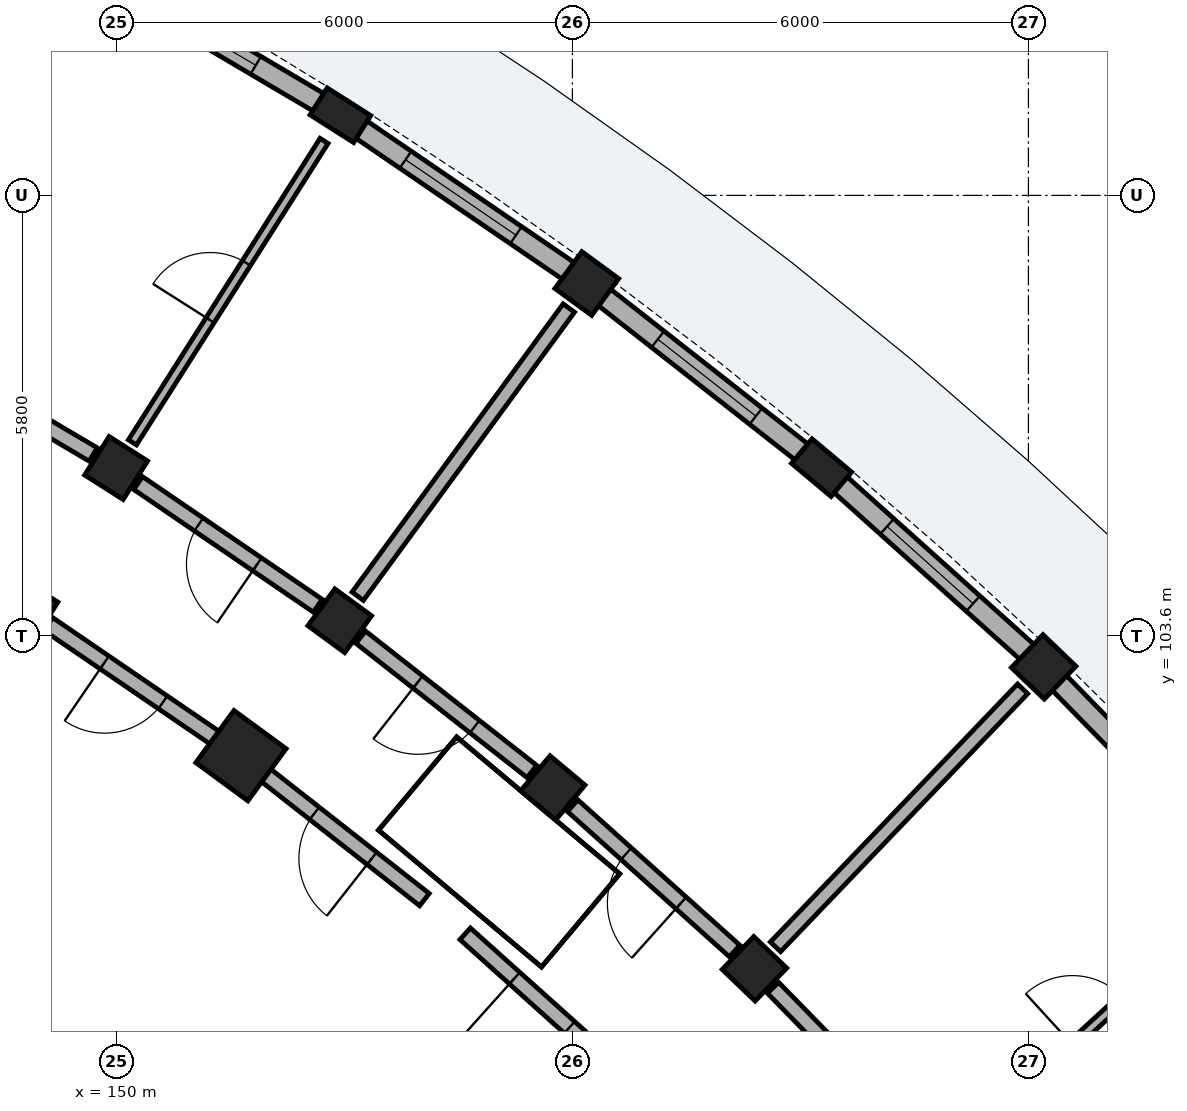
"""IFC4 building model, lengths in metres.
Left out: names, types, materials, properties, quantities, classifications, styles, units other than length and angle.
Written with IfcOpenShell. Run it as: python <this file> out.ifc"""

import sys

from ifc_helpers import new_model, si_unit, direction, frame, frame_2d, origin, origin_2d, place, context, subcontext, project, spatial, rectangle, extrude, element, fill, save


model = new_model("IFC4")
c1 = context("Model", 3, precision=1e-05, world=origin(), true_north=direction((0.0, 1.0)))
c2 = subcontext(c1, "Body", "Model", "MODEL_VIEW")
j1 = project(units=[si_unit("LENGTHUNIT", "METRE"), si_unit("PLANEANGLEUNIT", "RADIAN")], contexts=[c1])
p1 = place(None, origin())
s1 = spatial("IfcSite", under=j1, at=p1, CompositionType="ELEMENT")
p2 = place(p1, origin())
s2 = spatial("IfcBuilding", under=s1, at=p2, CompositionType="ELEMENT")
p3 = place(p2, origin())
s3 = spatial("IfcBuildingStorey", under=s2, at=p3, CompositionType="ELEMENT", Elevation=0.0)
for number, where, z_axis, x_axis in (
    (1, (158.395, 99.226, 0.0), (0.0, 0.0, 1.0), (0.692, 0.722, 0.0)),
    (2, (162.2, 103.197, 0.0), (0.0, 0.0, 1.0), (0.692, 0.722, 0.0)),
    (3, (155.743, 101.605, 0.0), (0.0, 0.0, 1.0), (0.643, 0.766, 0.0)),
):
    element("IfcColumn", number, at=place(p3, frame(where, z_axis=z_axis, x_axis=x_axis)), inside=s3, PredefinedType="COLUMN", context=c2, shape_type="SweptSolid", body=[
        extrude(rectangle(XDim=0.6, YDim=0.6, at=origin_2d()), origin(), (0.0, 0.0, 1.0), 4.485),
    ])
p4 = place(p3, frame((159.278, 105.818, 0.0), z_axis=(0.0, 0.0, 1.0), x_axis=(0.642787582947, 0.766044465556, 0.0)))
e4 = element("IfcColumn", 4, at=p4, inside=s3, PredefinedType="PILASTER", context=c2, shape_type="SweptSolid", body=[
    extrude(rectangle(XDim=0.42, YDim=0.68, at=origin_2d()), origin(), (0.0, 0.0, 1.0), 4.485),
])
p5 = place(p3, frame((151.639, 102.029, 0.0), z_axis=(0.0, 0.0, 1.0), x_axis=(0.590918572221, 0.806731207407, 0.0)))
e5 = element("IfcColumn", 5, at=p5, inside=s3, PredefinedType="COLUMN", context=c2, shape_type="SweptSolid", body=[
    extrude(rectangle(XDim=0.85, YDim=0.85, at=origin_2d()), origin(), (0.0, 0.0, 1.0), 4.485),
])
for number, where, z_axis, x_axis in (
    (6, (152.939, 103.804, 0.0), (0.0, 0.0, 1.0), (0.591, 0.807, 0.0)),
    (7, (156.189, 108.241, 0.0), (0.0, 0.0, 1.0), (0.591, 0.807, 0.0)),
    (8, (148.817, 103.957, 0.0), (0.0, 0.0, 1.0), (0.536, 0.844, 0.0)),
    (9, (149.997, 105.813, 0.0), (0.0, 0.0, 1.0), (0.536, 0.844, 0.0)),
):
    element("IfcColumn", number, at=place(p3, frame(where, z_axis=z_axis, x_axis=x_axis)), inside=s3, PredefinedType="COLUMN", context=c2, shape_type="SweptSolid", body=[
        extrude(rectangle(XDim=0.6, YDim=0.6, at=origin_2d()), origin(), (0.0, 0.0, 1.0), 4.485),
    ])
p6 = place(p3, frame((152.948, 110.455, 0.0), z_axis=(0.0, 0.0, 1.0), x_axis=(0.536481544469, 0.843912052553, 0.0)))
e10 = element("IfcColumn", 10, at=p6, inside=s3, PredefinedType="PILASTER", context=c2, shape_type="SweptSolid", body=[
    extrude(rectangle(XDim=0.42, YDim=0.68, at=origin_2d()), origin(), (0.0, 0.0, 1.0), 4.485),
])
p7 = place(p3, frame((164.818, 100.518, 0.0), z_axis=(0.0, 0.0, 1.0), x_axis=(-0.69884067125, 0.715277370121, 0.0)))
e11 = element("IfcWall", 11, at=p7, inside=s3, PredefinedType="SOLIDWALL", context=c2, shape_type="SweptSolid", body=[
    extrude(rectangle(XDim=3.476, YDim=0.27, at=frame_2d((1.738, 0.0))), origin(), (0.0, 0.0, 1.0), 3.755),
])
p8 = place(p7, frame((1.038, 0.0, 0.55)))
e12 = element("IfcOpeningElement", 12, at=p8, cuts=e11, PredefinedType="OPENING", context=c2, shape_type="SweptSolid", body=[
    extrude(rectangle(XDim=1.4, YDim=1.635, at=frame_2d((0.7, 0.817))), frame((0.0, 0.145, 0.0), z_axis=(0.0, -1.0, 0.0), x_axis=(1.0, 0.0, 0.0)), (0.0, 0.0, 1.0), 0.29),
])
p9 = place(p3, frame((162.0, 103.377, 0.0), z_axis=(0.0, 0.0, 1.0), x_axis=(-0.744452648125, 0.667675261411, 0.0)))
e13 = element("IfcWall", 13, at=p9, inside=s3, PredefinedType="SOLIDWALL", context=c2, shape_type="SweptSolid", body=[
    extrude(rectangle(XDim=3.476, YDim=0.27, at=frame_2d((1.738, 0.0))), origin(), (0.0, 0.0, 1.0), 3.755),
])
p10 = place(p9, frame((0.978, 0.0, 0.55)))
e14 = element("IfcOpeningElement", 14, at=p10, cuts=e13, PredefinedType="OPENING", context=c2, shape_type="SweptSolid", body=[
    extrude(rectangle(XDim=1.52, YDim=1.485, at=frame_2d((0.76, 0.743))), frame((0.0, 0.145, 0.0), z_axis=(0.0, -1.0, 0.0), x_axis=(1.0, 0.0, 0.0)), (0.0, 0.0, 1.0), 0.29),
])
p11 = place(p3, frame((159.136, 105.929, 0.0), z_axis=(0.0, 0.0, 1.0), x_axis=(-0.786815295284, 0.617188537731, 0.0)))
e15 = element("IfcWall", 15, at=p11, inside=s3, PredefinedType="SOLIDWALL", context=c2, shape_type="SweptSolid", body=[
    extrude(rectangle(XDim=3.476, YDim=0.27, at=frame_2d((1.738, 0.0))), origin(), (0.0, 0.0, 1.0), 3.755),
])
p12 = place(p11, frame((0.918, 0.0, 0.55)))
e16 = element("IfcOpeningElement", 16, at=p12, cuts=e15, PredefinedType="OPENING", context=c2, shape_type="SweptSolid", body=[
    extrude(rectangle(XDim=1.64, YDim=1.56, at=frame_2d((0.82, 0.78))), frame((0.0, 0.145, 0.0), z_axis=(0.0, -1.0, 0.0), x_axis=(1.0, 0.0, 0.0)), (0.0, 0.0, 1.0), 0.29),
])
p13 = place(p3, frame((155.966, 108.393, 0.0), z_axis=(0.0, 0.0, 1.0), x_axis=(-0.825751510897, 0.564034078981, 0.0)))
e17 = element("IfcWall", 17, at=p13, inside=s3, PredefinedType="SOLIDWALL", context=c2, shape_type="SweptSolid", body=[
    extrude(rectangle(XDim=3.476, YDim=0.27, at=frame_2d((1.738, 0.0))), origin(), (0.0, 0.0, 1.0), 3.755),
])
p14 = place(p13, frame((0.858, 0.0, 0.55)))
e18 = element("IfcOpeningElement", 18, at=p14, cuts=e17, PredefinedType="OPENING", context=c2, shape_type="SweptSolid", body=[
    extrude(rectangle(XDim=1.76, YDim=1.635, at=frame_2d((0.88, 0.817))), frame((0.0, 0.145, 0.0), z_axis=(0.0, -1.0, 0.0), x_axis=(1.0, 0.0, 0.0)), (0.0, 0.0, 1.0), 0.29),
])
p15 = place(p3, frame((152.792, 110.546, 0.0), z_axis=(0.0, 0.0, 1.0), x_axis=(-0.861127819205, 0.50838851186, 0.0)))
e19 = element("IfcWall", 19, at=p15, inside=s3, PredefinedType="SOLIDWALL", context=c2, shape_type="SweptSolid", body=[
    extrude(rectangle(XDim=3.476, YDim=0.27, at=frame_2d((1.738, 0.0))), origin(), (0.0, 0.0, 1.0), 3.755),
])
p16 = place(p15, frame((1.113, 0.0, 0.55)))
e20 = element("IfcOpeningElement", 20, at=p16, cuts=e19, PredefinedType="OPENING", context=c2, shape_type="SweptSolid", body=[
    extrude(rectangle(XDim=1.25, YDim=1.6, at=frame_2d((0.625, 0.8))), frame((0.0, 0.145, 0.0), z_axis=(0.0, -1.0, 0.0), x_axis=(1.0, 0.0, 0.0)), (0.0, 0.0, 1.0), 0.29),
])
p17 = place(p3, frame((161.18, 96.947, 0.0), z_axis=(0.0, 0.0, 1.0), x_axis=(0.737934199263, 0.674872667663, 0.0)))
e21 = element("IfcWall", 21, at=p17, inside=s3, PredefinedType="PARTITIONING", context=c2, shape_type="SweptSolid", body=[
    extrude(rectangle(XDim=4.7, YDim=0.125, at=frame_2d((2.35, 0.0))), origin(), (0.0, 0.0, 1.0), 3.1),
])
p18 = place(p17, frame((1.895, 0.0, 0.0)))
e22 = element("IfcOpeningElement", 22, at=p18, cuts=e21, PredefinedType="OPENING", context=c2, shape_type="SweptSolid", body=[
    extrude(rectangle(XDim=0.91, YDim=2.1, at=frame_2d((0.455, 1.05))), frame((0.0, 0.073, 0.0), z_axis=(0.0, -1.0, 0.0), x_axis=(1.0, 0.0, 0.0)), (0.0, 0.0, 1.0), 0.145),
])
p19 = place(p3, frame((160.641, 96.927, 0.0), z_axis=(0.0, 0.0, 1.0), x_axis=(-0.698787219683, 0.715329589496, 0.0)))
e23 = element("IfcWall", 23, at=p19, inside=s3, PredefinedType="PARTITIONING", context=c2, shape_type="SweptSolid", body=[
    extrude(rectangle(XDim=2.863, YDim=0.205, at=frame_2d((1.432, 0.0))), origin(), (0.0, 0.0, 1.0), 3.1),
])
p20 = place(p19, frame((0.937, 0.0, 0.0)))
e24 = element("IfcOpeningElement", 24, at=p20, cuts=e23, PredefinedType="OPENING", context=c2, shape_type="SweptSolid", body=[
    extrude(rectangle(XDim=0.99, YDim=2.16, at=frame_2d((0.495, 1.08))), frame((0.0, 0.113, 0.0), z_axis=(0.0, -1.0, 0.0), x_axis=(1.0, 0.0, 0.0)), (0.0, 0.0, 1.0), 0.225),
])
p21 = place(p3, frame((158.672, 99.514, 0.0), z_axis=(0.0, 0.0, 1.0), x_axis=(0.691855720025, 0.722035776585, 0.0)))
e25 = element("IfcWall", 25, at=p21, inside=s3, PredefinedType="PARTITIONING", context=c2, shape_type="SweptSolid", body=[
    extrude(rectangle(XDim=4.7, YDim=0.185, at=frame_2d((2.35, 0.0))), origin(), (0.0, 0.0, 1.0), 3.1),
])
p22 = place(p3, frame((158.135, 99.459, 0.0), z_axis=(0.0, 0.0, 1.0), x_axis=(-0.744433521088, 0.667696587291, 0.0)))
e26 = element("IfcWall", 26, at=p22, inside=s3, PredefinedType="PARTITIONING", context=c2, shape_type="SweptSolid", body=[
    extrude(rectangle(XDim=2.863, YDim=0.205, at=frame_2d((1.432, 0.0))), origin(), (0.0, 0.0, 1.0), 3.1),
])
p23 = place(p22, frame((0.947, 0.0, 0.0)))
e27 = element("IfcOpeningElement", 27, at=p23, cuts=e26, PredefinedType="OPENING", context=c2, shape_type="SweptSolid", body=[
    extrude(rectangle(XDim=0.97, YDim=2.15, at=frame_2d((0.485, 1.075))), frame((0.0, 0.113, 0.0), z_axis=(0.0, -1.0, 0.0), x_axis=(1.0, 0.0, 0.0)), (0.0, 0.0, 1.0), 0.225),
])
p24 = place(p3, frame((156.613, 97.871, 0.0), z_axis=(0.0, 0.0, 1.0), x_axis=(-0.744418559135, 0.667713268413, 0.0)))
e28 = element("IfcWall", 28, at=p24, inside=s3, PredefinedType="PARTITIONING", context=c2, shape_type="SweptSolid", body=[
    extrude(rectangle(XDim=2.718, YDim=0.205, at=frame_2d((1.359, 0.0))), origin(), (0.0, 0.0, 1.0), 3.1),
])
p25 = place(p24, frame((0.874, 0.0, 0.0)))
e29 = element("IfcOpeningElement", 29, at=p25, cuts=e28, PredefinedType="OPENING", context=c2, shape_type="SweptSolid", body=[
    extrude(rectangle(XDim=0.97, YDim=2.15, at=frame_2d((0.485, 1.075))), frame((0.0, 0.113, 0.0), z_axis=(0.0, -1.0, 0.0), x_axis=(1.0, 0.0, 0.0)), (0.0, 0.0, 1.0), 0.225),
])
p26 = place(p3, frame((155.467, 101.821, 0.0), z_axis=(0.0, 0.0, 1.0), x_axis=(-0.786806323554, 0.617199975061, 0.0)))
e30 = element("IfcWall", 30, at=p26, inside=s3, PredefinedType="PARTITIONING", context=c2, shape_type="SweptSolid", body=[
    extrude(rectangle(XDim=2.863, YDim=0.205, at=frame_2d((1.432, 0.0))), origin(), (0.0, 0.0, 1.0), 3.1),
])
p27 = place(p26, frame((0.957, 0.0, 0.0)))
e31 = element("IfcOpeningElement", 31, at=p27, cuts=e30, PredefinedType="OPENING", context=c2, shape_type="SweptSolid", body=[
    extrude(rectangle(XDim=0.95, YDim=2.13, at=frame_2d((0.475, 1.065))), frame((0.0, 0.113, 0.0), z_axis=(0.0, -1.0, 0.0), x_axis=(1.0, 0.0, 0.0)), (0.0, 0.0, 1.0), 0.225),
])
p28 = place(p3, frame((154.053, 100.135, 0.0), z_axis=(0.0, 0.0, 1.0), x_axis=(-0.786835457019, 0.617162833924, 0.0)))
e32 = element("IfcWall", 32, at=p28, inside=s3, PredefinedType="PARTITIONING", context=c2, shape_type="SweptSolid", body=[
    extrude(rectangle(XDim=2.718, YDim=0.205, at=frame_2d((1.359, 0.0))), origin(), (0.0, 0.0, 1.0), 3.1),
])
p29 = place(p28, frame((0.879, 0.0, 0.0)))
e33 = element("IfcOpeningElement", 33, at=p29, cuts=e32, PredefinedType="OPENING", context=c2, shape_type="SweptSolid", body=[
    extrude(rectangle(XDim=0.96, YDim=2.1, at=frame_2d((0.48, 1.05))), frame((0.0, 0.113, 0.0), z_axis=(0.0, -1.0, 0.0), x_axis=(1.0, 0.0, 0.0)), (0.0, 0.0, 1.0), 0.225),
])
p30 = place(p3, frame((153.176, 104.126, 0.0), z_axis=(0.0, 0.0, 1.0), x_axis=(0.590910940129, 0.806736797745, 0.0)))
e34 = element("IfcWall", 34, at=p30, inside=s3, PredefinedType="PARTITIONING", context=c2, shape_type="SweptSolid", body=[
    extrude(rectangle(XDim=4.7, YDim=0.185, at=frame_2d((2.35, 0.0))), origin(), (0.0, 0.0, 1.0), 3.1),
])
p31 = place(p3, frame((152.65, 104.001, 0.0), z_axis=(0.0, 0.0, 1.0), x_axis=(-0.825779671787, 0.563992848947, 0.0)))
e35 = element("IfcWall", 35, at=p31, inside=s3, PredefinedType="PARTITIONING", context=c2, shape_type="SweptSolid", body=[
    extrude(rectangle(XDim=2.863, YDim=0.205, at=frame_2d((1.432, 0.0))), origin(), (0.0, 0.0, 1.0), 3.1),
])
p32 = place(p31, frame((0.967, 0.0, 0.0)))
e36 = element("IfcOpeningElement", 36, at=p32, cuts=e35, PredefinedType="OPENING", context=c2, shape_type="SweptSolid", body=[
    extrude(rectangle(XDim=0.93, YDim=2.12, at=frame_2d((0.465, 1.06))), frame((0.0, 0.113, 0.0), z_axis=(0.0, -1.0, 0.0), x_axis=(1.0, 0.0, 0.0)), (0.0, 0.0, 1.0), 0.225),
])
p33 = place(p3, frame((151.35, 102.226, 0.0), z_axis=(0.0, 0.0, 1.0), x_axis=(-0.825752009056, 0.56403334967, 0.0)))
e37 = element("IfcWall", 37, at=p33, inside=s3, PredefinedType="PARTITIONING", context=c2, shape_type="SweptSolid", body=[
    extrude(rectangle(XDim=2.718, YDim=0.205, at=frame_2d((1.359, 0.0))), origin(), (0.0, 0.0, 1.0), 3.1),
])
p34 = place(p33, frame((0.894, 0.0, 0.0)))
e38 = element("IfcOpeningElement", 38, at=p34, cuts=e37, PredefinedType="OPENING", context=c2, shape_type="SweptSolid", body=[
    extrude(rectangle(XDim=0.93, YDim=2.12, at=frame_2d((0.465, 1.06))), frame((0.0, 0.113, 0.0), z_axis=(0.0, -1.0, 0.0), x_axis=(1.0, 0.0, 0.0)), (0.0, 0.0, 1.0), 0.225),
])
p35 = place(p3, frame((150.211, 106.151, 0.0), z_axis=(0.0, 0.0, 1.0), x_axis=(0.536492262982, 0.843905238614, 0.0)))
e39 = element("IfcWall", 39, at=p35, inside=s3, PredefinedType="PARTITIONING", context=c2, shape_type="SweptSolid", body=[
    extrude(rectangle(XDim=4.7, YDim=0.125, at=frame_2d((2.35, 0.0))), origin(), (0.0, 0.0, 1.0), 3.1),
])
p36 = place(p35, frame((1.905, 0.0, 0.0)))
e40 = element("IfcOpeningElement", 40, at=p36, cuts=e39, PredefinedType="OPENING", context=c2, shape_type="SweptSolid", body=[
    extrude(rectangle(XDim=0.89, YDim=2.1, at=frame_2d((0.445, 1.05))), frame((0.0, 0.073, 0.0), z_axis=(0.0, -1.0, 0.0), x_axis=(1.0, 0.0, 0.0)), (0.0, 0.0, 1.0), 0.145),
])
p37 = place(p3, frame((149.695, 105.991, 0.0), z_axis=(0.0, 0.0, 1.0), x_axis=(-0.861113214678, 0.508413248753, 0.0)))
e41 = element("IfcWall", 41, at=p37, inside=s3, PredefinedType="PARTITIONING", context=c2, shape_type="SweptSolid", body=[
    extrude(rectangle(XDim=2.863, YDim=0.205, at=frame_2d((1.432, 0.0))), origin(), (0.0, 0.0, 1.0), 3.1),
])
p38 = place(p37, frame((0.937, 0.0, 0.0)))
e42 = element("IfcOpeningElement", 42, at=p38, cuts=e41, PredefinedType="OPENING", context=c2, shape_type="SweptSolid", body=[
    extrude(rectangle(XDim=0.99, YDim=2.16, at=frame_2d((0.495, 1.08))), frame((0.0, 0.113, 0.0), z_axis=(0.0, -1.0, 0.0), x_axis=(1.0, 0.0, 0.0)), (0.0, 0.0, 1.0), 0.225),
])
p39 = place(p10, origin())
e43 = element("IfcWindow", 43, at=p39, inside=s3, PartitioningType="SINGLE_PANEL", PredefinedType="WINDOW", context=c2, shape_type="SweptSolid", body=[
    extrude(rectangle(XDim=1.52, YDim=1.485, at=frame_2d((0.76, 0.743))), frame((0.0, 0.03, 0.0), z_axis=(0.0, -1.0, 0.0), x_axis=(1.0, 0.0, 0.0)), (0.0, 0.0, 1.0), 0.06),
])
fill(e14, e43)
p40 = place(p12, origin())
e44 = element("IfcWindow", 44, at=p40, inside=s3, PartitioningType="SINGLE_PANEL", PredefinedType="WINDOW", context=c2, shape_type="SweptSolid", body=[
    extrude(rectangle(XDim=1.64, YDim=1.56, at=frame_2d((0.82, 0.78))), frame((0.0, 0.03, 0.0), z_axis=(0.0, -1.0, 0.0), x_axis=(1.0, 0.0, 0.0)), (0.0, 0.0, 1.0), 0.06),
])
fill(e16, e44)
p41 = place(p14, origin())
e45 = element("IfcWindow", 45, at=p41, inside=s3, PartitioningType="SINGLE_PANEL", PredefinedType="WINDOW", context=c2, shape_type="SweptSolid", body=[
    extrude(rectangle(XDim=1.76, YDim=1.635, at=frame_2d((0.88, 0.817))), frame((0.0, 0.03, 0.0), z_axis=(0.0, -1.0, 0.0), x_axis=(1.0, 0.0, 0.0)), (0.0, 0.0, 1.0), 0.06),
])
fill(e18, e45)
p42 = place(p16, origin())
e46 = element("IfcWindow", 46, at=p42, inside=s3, PartitioningType="SINGLE_PANEL", PredefinedType="WINDOW", context=c2, shape_type="SweptSolid", body=[
    extrude(rectangle(XDim=1.25, YDim=1.6, at=frame_2d((0.625, 0.8))), frame((0.0, 0.03, 0.0), z_axis=(0.0, -1.0, 0.0), x_axis=(1.0, 0.0, 0.0)), (0.0, 0.0, 1.0), 0.06),
])
fill(e20, e46)
p43 = place(p18, origin())
e47 = element("IfcDoor", 47, at=p43, inside=s3, OperationType="SINGLE_SWING_LEFT", PredefinedType="DOOR", context=c2, shape_type="SweptSolid", body=[
    extrude(rectangle(XDim=0.91, YDim=2.1, at=frame_2d((0.455, 1.05))), frame((0.0, 0.025, 0.0), z_axis=(0.0, -1.0, 0.0), x_axis=(1.0, 0.0, 0.0)), (0.0, 0.0, 1.0), 0.05),
])
fill(e22, e47)
p44 = place(p23, origin())
e48 = element("IfcDoor", 48, at=p44, inside=s3, OperationType="SINGLE_SWING_LEFT", PredefinedType="DOOR", context=c2, shape_type="SweptSolid", body=[
    extrude(rectangle(XDim=0.97, YDim=2.15, at=frame_2d((0.485, 1.075))), frame((0.0, 0.025, 0.0), z_axis=(0.0, -1.0, 0.0), x_axis=(1.0, 0.0, 0.0)), (0.0, 0.0, 1.0), 0.05),
])
fill(e27, e48)
p45 = place(p25, origin())
e49 = element("IfcDoor", 49, at=p45, inside=s3, OperationType="SINGLE_SWING_RIGHT", PredefinedType="DOOR", context=c2, shape_type="SweptSolid", body=[
    extrude(rectangle(XDim=0.97, YDim=2.15, at=frame_2d((0.485, 1.075))), frame((0.0, 0.025, 0.0), z_axis=(0.0, -1.0, 0.0), x_axis=(1.0, 0.0, 0.0)), (0.0, 0.0, 1.0), 0.05),
])
fill(e29, e49)
p46 = place(p27, origin())
e50 = element("IfcDoor", 50, at=p46, inside=s3, OperationType="SINGLE_SWING_RIGHT", PredefinedType="DOOR", context=c2, shape_type="SweptSolid", body=[
    extrude(rectangle(XDim=0.95, YDim=2.13, at=frame_2d((0.475, 1.065))), frame((0.0, 0.025, 0.0), z_axis=(0.0, -1.0, 0.0), x_axis=(1.0, 0.0, 0.0)), (0.0, 0.0, 1.0), 0.05),
])
fill(e31, e50)
p47 = place(p29, origin())
e51 = element("IfcDoor", 51, at=p47, inside=s3, OperationType="SINGLE_SWING_LEFT", PredefinedType="DOOR", context=c2, shape_type="SweptSolid", body=[
    extrude(rectangle(XDim=0.96, YDim=2.1, at=frame_2d((0.48, 1.05))), frame((0.0, 0.025, 0.0), z_axis=(0.0, -1.0, 0.0), x_axis=(1.0, 0.0, 0.0)), (0.0, 0.0, 1.0), 0.05),
])
fill(e33, e51)
p48 = place(p32, origin())
e52 = element("IfcDoor", 52, at=p48, inside=s3, OperationType="SINGLE_SWING_LEFT", PredefinedType="DOOR", context=c2, shape_type="SweptSolid", body=[
    extrude(rectangle(XDim=0.93, YDim=2.12, at=frame_2d((0.465, 1.06))), frame((0.0, 0.025, 0.0), z_axis=(0.0, -1.0, 0.0), x_axis=(1.0, 0.0, 0.0)), (0.0, 0.0, 1.0), 0.05),
])
fill(e36, e52)
p49 = place(p34, origin())
e53 = element("IfcDoor", 53, at=p49, inside=s3, OperationType="SINGLE_SWING_RIGHT", PredefinedType="DOOR", context=c2, shape_type="SweptSolid", body=[
    extrude(rectangle(XDim=0.93, YDim=2.12, at=frame_2d((0.465, 1.06))), frame((0.0, 0.025, 0.0), z_axis=(0.0, -1.0, 0.0), x_axis=(1.0, 0.0, 0.0)), (0.0, 0.0, 1.0), 0.05),
])
fill(e38, e53)
p50 = place(p36, origin())
e54 = element("IfcDoor", 54, at=p50, inside=s3, OperationType="SINGLE_SWING_LEFT", PredefinedType="DOOR", context=c2, shape_type="SweptSolid", body=[
    extrude(rectangle(XDim=0.89, YDim=2.1, at=frame_2d((0.445, 1.05))), frame((0.0, 0.025, 0.0), z_axis=(0.0, -1.0, 0.0), x_axis=(1.0, 0.0, 0.0)), (0.0, 0.0, 1.0), 0.05),
])
fill(e40, e54)
save(model, sys.argv[1])
